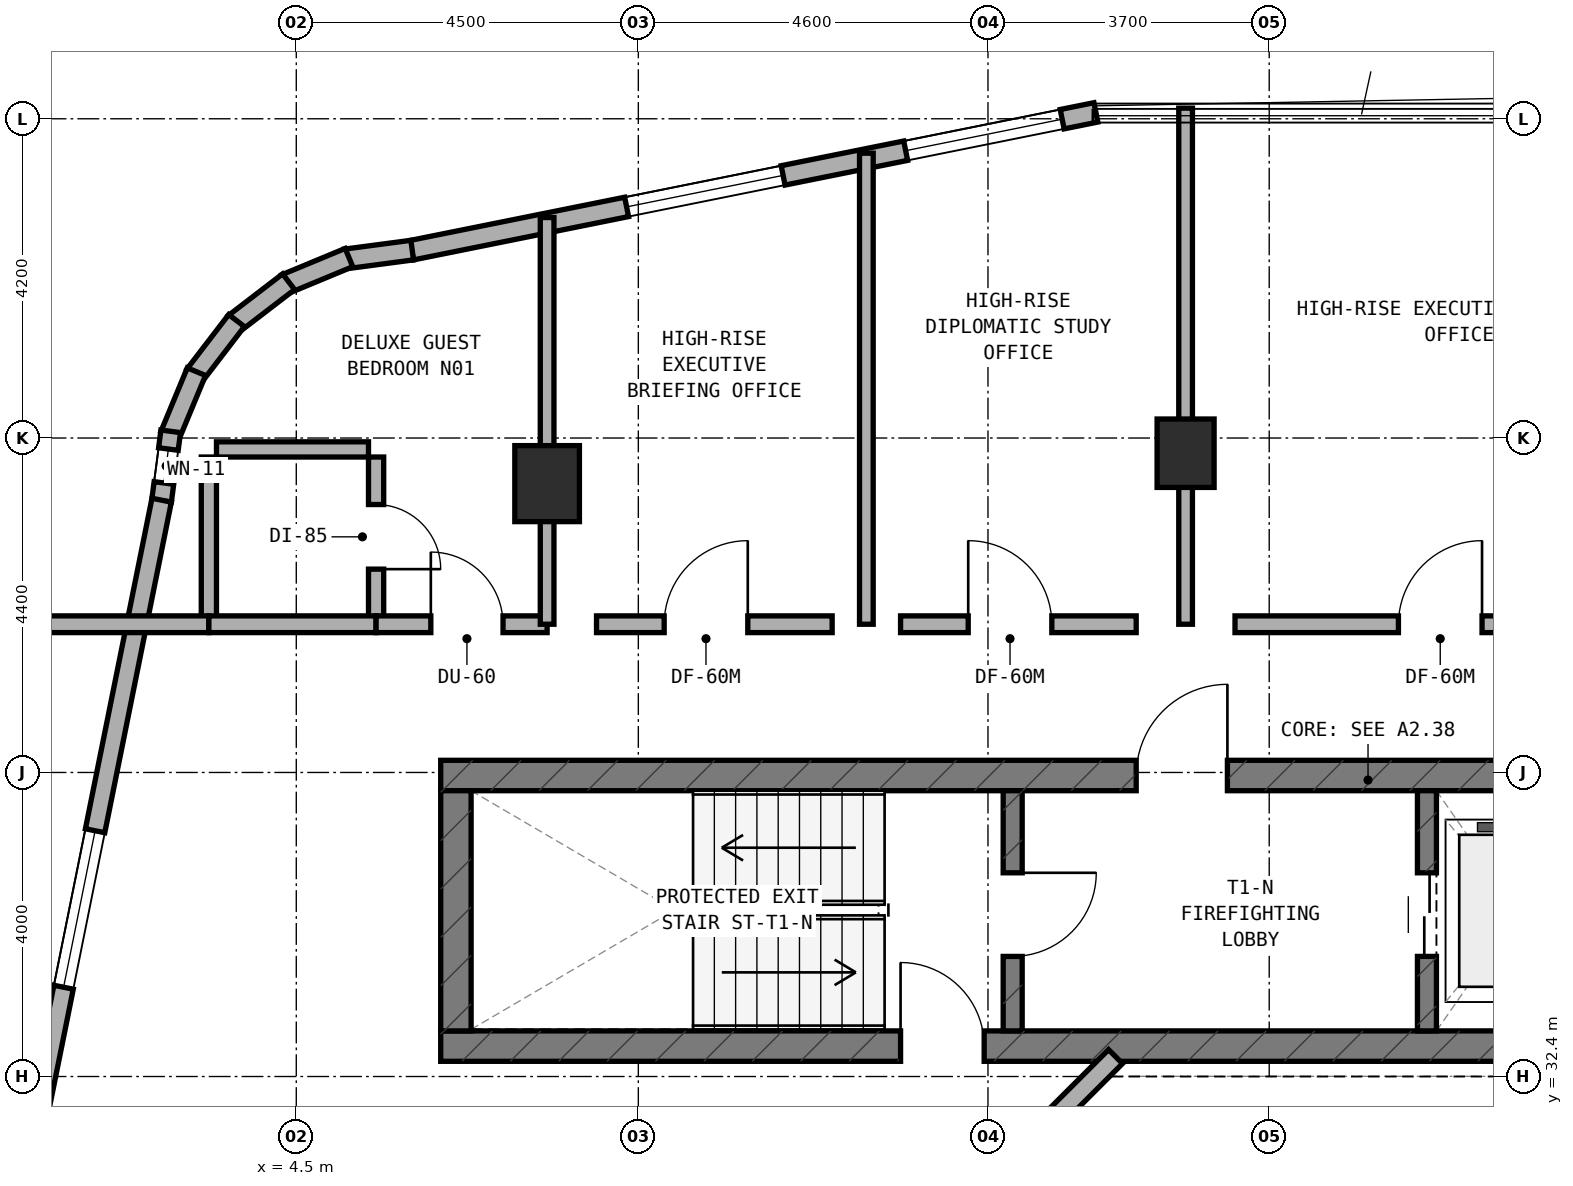
"""IFC4 building model, lengths in metres.
Left out: names, types, materials, properties, quantities, classifications, styles, units other than length and angle.
Written with IfcOpenShell. Run it as: python <this file> out.ifc"""

import sys

from ifc_helpers import new_model, si_unit, direction, frame, frame_2d, origin, origin_2d, place, context, subcontext, project, spatial, rectangle, extrude, element, fill, save


model = new_model("IFC4")
c1 = context("Model", 3, precision=1e-05, world=origin(), true_north=direction((0.0, 1.0)))
c2 = subcontext(c1, "Body", "Model", "MODEL_VIEW")
j1 = project(units=[si_unit("LENGTHUNIT", "METRE"), si_unit("PLANEANGLEUNIT", "RADIAN")], contexts=[c1])
p1 = place(None, origin())
s1 = spatial("IfcSite", under=j1, at=p1, CompositionType="ELEMENT")
p2 = place(p1, origin())
s2 = spatial("IfcBuilding", under=s1, at=p2, CompositionType="ELEMENT")
p3 = place(p2, frame((0.0, 0.0, 169.5)))
s3 = spatial("IfcBuildingStorey", under=s2, at=p3, CompositionType="ELEMENT", Elevation=169.5)
p4 = place(p3, frame((6.4, 32.8, 0.0), z_axis=(0.0, 0.0, 1.0), x_axis=(1.0, 0.0, 0.0)))
e1 = element("IfcWall", 1, at=p4, inside=s3, PredefinedType="SHEAR", context=c2, shape_type="SweptSolid", body=[
    extrude(rectangle(XDim=24.4, YDim=0.4, at=frame_2d((12.2, 0.0))), origin(), (0.0, 0.0, 1.0), 3.5),
])
p5 = place(p4, frame((6.05, 0.0, 0.0)))
e2 = element("IfcOpeningElement", 2, at=p5, cuts=e1, PredefinedType="OPENING", context=c2, shape_type="SweptSolid", body=[
    extrude(rectangle(XDim=1.1, YDim=2.15, at=frame_2d((0.55, 1.075))), frame((0.0, 0.21, 0.0), z_axis=(0.0, -1.0, 0.0), x_axis=(1.0, 0.0, 0.0)), (0.0, 0.0, 1.0), 0.42),
])
p6 = place(p3, frame((6.4, 36.36, 0.0), z_axis=(0.0, 0.0, 1.0), x_axis=(1.0, 0.0, 0.0)))
e3 = element("IfcWall", 3, at=p6, inside=s3, PredefinedType="SHEAR", context=c2, shape_type="SweptSolid", body=[
    extrude(rectangle(XDim=24.4, YDim=0.4, at=frame_2d((12.2, 0.0))), origin(), (0.0, 0.0, 1.0), 3.5),
])
p7 = place(p6, frame((9.15, 0.0, 0.0)))
e4 = element("IfcOpeningElement", 4, at=p7, cuts=e3, PredefinedType="OPENING", context=c2, shape_type="SweptSolid", body=[
    extrude(rectangle(XDim=1.2, YDim=2.15, at=frame_2d((0.6, 1.075))), frame((0.0, 0.21, 0.0), z_axis=(0.0, -1.0, 0.0), x_axis=(1.0, 0.0, 0.0)), (0.0, 0.0, 1.0), 0.42),
])
p8 = place(p6, frame((19.2, 0.0, 0.0)))
e5 = element("IfcOpeningElement", 5, at=p8, cuts=e3, PredefinedType="OPENING", context=c2, shape_type="SweptSolid", body=[
    extrude(rectangle(XDim=0.85, YDim=2.1, at=frame_2d((0.425, 1.05))), frame((0.0, 0.21, 0.0), z_axis=(0.0, -1.0, 0.0), x_axis=(1.0, 0.0, 0.0)), (0.0, 0.0, 1.0), 0.42),
])
p9 = place(p6, frame((16.94, 0.0, 0.0)))
e6 = element("IfcOpeningElement", 6, at=p9, cuts=e3, PredefinedType="OPENING", context=c2, shape_type="SweptSolid", body=[
    extrude(rectangle(XDim=0.85, YDim=2.1, at=frame_2d((0.425, 1.05))), frame((0.0, 0.21, 0.0), z_axis=(0.0, -1.0, 0.0), x_axis=(1.0, 0.0, 0.0)), (0.0, 0.0, 1.0), 0.42),
])
p10 = place(p3, frame((6.6, 33.0, 0.0), z_axis=(0.0, 0.0, 1.0), x_axis=(0.0, 1.0, 0.0)))
e7 = element("IfcWall", 7, at=p10, inside=s3, PredefinedType="SHEAR", context=c2, shape_type="SweptSolid", body=[
    extrude(rectangle(XDim=3.16, YDim=0.4, at=frame_2d((1.58, 0.0))), origin(), (0.0, 0.0, 1.0), 3.5),
])
p11 = place(p3, frame((13.925, 33.0, 0.0), z_axis=(0.0, 0.0, 1.0), x_axis=(0.0, 1.0, 0.0)))
e8 = element("IfcWall", 8, at=p11, inside=s3, PredefinedType="STANDARD", context=c2, shape_type="SweptSolid", body=[
    extrude(rectangle(XDim=3.16, YDim=0.25, at=frame_2d((1.58, 0.0))), origin(), (0.0, 0.0, 1.0), 3.18),
])
p12 = place(p11, frame((0.98, 0.0, 0.0)))
e9 = element("IfcOpeningElement", 9, at=p12, cuts=e8, PredefinedType="OPENING", context=c2, shape_type="SweptSolid", body=[
    extrude(rectangle(XDim=1.1, YDim=2.15, at=frame_2d((0.55, 1.075))), frame((0.0, 0.135, 0.0), z_axis=(0.0, -1.0, 0.0), x_axis=(1.0, 0.0, 0.0)), (0.0, 0.0, 1.0), 0.27),
])
p13 = place(p3, frame((19.375, 33.0, 0.0), z_axis=(0.0, 0.0, 1.0), x_axis=(0.0, 1.0, 0.0)))
e10 = element("IfcWall", 10, at=p13, inside=s3, PredefinedType="STANDARD", context=c2, shape_type="SweptSolid", body=[
    extrude(rectangle(XDim=3.16, YDim=0.25, at=frame_2d((1.58, 0.0))), origin(), (0.0, 0.0, 1.0), 3.18),
])
p14 = place(p13, frame((0.98, 0.0, 0.0)))
e11 = element("IfcOpeningElement", 11, at=p14, cuts=e10, PredefinedType="OPENING", context=c2, shape_type="SweptSolid", body=[
    extrude(rectangle(XDim=1.1, YDim=2.15, at=frame_2d((0.55, 1.075))), frame((0.0, 0.135, 0.0), z_axis=(0.0, -1.0, 0.0), x_axis=(1.0, 0.0, 0.0)), (0.0, 0.0, 1.0), 0.27),
])
p15 = place(p3, frame((16.2, 40.6, 0.0), z_axis=(0.0, 0.0, 1.0), x_axis=(1.0, 0.0, 0.0)))
e12 = element("IfcColumn", 12, at=p15, inside=s3, PredefinedType="COLUMN", context=c2, shape_type="SweptSolid", body=[
    extrude(rectangle(XDim=0.75, YDim=0.9, at=origin_2d()), origin(), (0.0, 0.0, 1.0), 3.5),
])
p16 = place(p3, frame((7.8, 40.2, 0.0), z_axis=(0.0, 0.0, 1.0), x_axis=(1.0, 0.0, 0.0)))
e13 = element("IfcColumn", 13, at=p16, inside=s3, PredefinedType="COLUMN", context=c2, shape_type="SweptSolid", body=[
    extrude(rectangle(XDim=0.85, YDim=1.0, at=origin_2d()), origin(), (0.0, 0.0, 1.0), 3.5),
])
p17 = place(p3, frame((15.02, 45.084, 0.0), z_axis=(0.0, 0.0, 1.0), x_axis=(-0.980315963543, -0.197435082048, 0.0)))
e14 = element("IfcWall", 14, at=p17, inside=s3, PredefinedType="STANDARD", context=c2, shape_type="SweptSolid", body=[
    extrude(rectangle(XDim=9.183, YDim=0.26, at=frame_2d((4.591, 0.0))), origin(), (0.0, 0.0, 1.0), 3.18),
])
p18 = place(p17, frame((0.453, 0.0, 0.85)))
e15 = element("IfcOpeningElement", 15, at=p18, cuts=e14, PredefinedType="OPENING", context=c2, shape_type="SweptSolid", body=[
    extrude(rectangle(XDim=2.1, YDim=1.5, at=frame_2d((1.05, 0.75))), frame((0.0, 0.14, 0.0), z_axis=(0.0, -1.0, 0.0), x_axis=(1.0, 0.0, 0.0)), (0.0, 0.0, 1.0), 0.28),
])
p19 = place(p17, frame((4.198, 0.0, 0.85)))
e16 = element("IfcOpeningElement", 16, at=p19, cuts=e14, PredefinedType="OPENING", context=c2, shape_type="SweptSolid", body=[
    extrude(rectangle(XDim=2.1, YDim=1.5, at=frame_2d((1.05, 0.75))), frame((0.0, 0.14, 0.0), z_axis=(0.0, -1.0, 0.0), x_axis=(1.0, 0.0, 0.0)), (0.0, 0.0, 1.0), 0.28),
])
p20 = place(p3, frame((6.025, 43.272, 0.0), z_axis=(0.0, 0.0, 1.0), x_axis=(-0.991388484223, -0.130953706898, 0.0)))
e17 = element("IfcWall", 17, at=p20, inside=s3, PredefinedType="STANDARD", context=c2, shape_type="SweptSolid", body=[
    extrude(rectangle(XDim=0.885, YDim=0.26, at=frame_2d((0.443, 0.0))), origin(), (0.0, 0.0, 1.0), 3.18),
])
p21 = place(p3, frame((5.193, 43.174, 0.0), z_axis=(0.0, 0.0, 1.0), x_axis=(-0.923627776508, -0.383290660547, 0.0)))
e18 = element("IfcWall", 18, at=p21, inside=s3, PredefinedType="STANDARD", context=c2, shape_type="SweptSolid", body=[
    extrude(rectangle(XDim=0.903, YDim=0.26, at=frame_2d((0.452, 0.0))), origin(), (0.0, 0.0, 1.0), 3.18),
])
p22 = place(p3, frame((4.399, 42.856, 0.0), z_axis=(0.0, 0.0, 1.0), x_axis=(-0.793458244748, -0.608624690463, 0.0)))
e19 = element("IfcWall", 19, at=p22, inside=s3, PredefinedType="STANDARD", context=c2, shape_type="SweptSolid", body=[
    extrude(rectangle(XDim=0.902, YDim=0.26, at=frame_2d((0.451, 0.0))), origin(), (0.0, 0.0, 1.0), 3.18),
])
p23 = place(p3, frame((3.714, 42.345, 0.0), z_axis=(0.0, 0.0, 1.0), x_axis=(-0.608494022858, -0.793558456666, 0.0)))
e20 = element("IfcWall", 20, at=p23, inside=s3, PredefinedType="STANDARD", context=c2, shape_type="SweptSolid", body=[
    extrude(rectangle(XDim=0.902, YDim=0.26, at=frame_2d((0.451, 0.0))), origin(), (0.0, 0.0, 1.0), 3.18),
])
p24 = place(p3, frame((3.186, 41.673, 0.0), z_axis=(0.0, 0.0, 1.0), x_axis=(-0.383155708213, -0.923683767999, 0.0)))
e21 = element("IfcWall", 21, at=p24, inside=s3, PredefinedType="STANDARD", context=c2, shape_type="SweptSolid", body=[
    extrude(rectangle(XDim=0.903, YDim=0.26, at=frame_2d((0.451, 0.0))), origin(), (0.0, 0.0, 1.0), 3.18),
])
p25 = place(p3, frame((2.848, 40.888, 0.0), z_axis=(0.0, 0.0, 1.0), x_axis=(-0.130200706103, -0.991487658083, 0.0)))
e22 = element("IfcWall", 22, at=p25, inside=s3, PredefinedType="STANDARD", context=c2, shape_type="SweptSolid", body=[
    extrude(rectangle(XDim=0.921, YDim=0.26, at=frame_2d((0.46, 0.0))), origin(), (0.0, 0.0, 1.0), 3.18),
])
p26 = place(p25, frame((0.235, 0.0, 0.85)))
e23 = element("IfcOpeningElement", 23, at=p26, cuts=e22, PredefinedType="OPENING", context=c2, shape_type="SweptSolid", body=[
    extrude(rectangle(XDim=0.45, YDim=1.5, at=frame_2d((0.225, 0.75))), frame((0.0, 0.14, 0.0), z_axis=(0.0, -1.0, 0.0), x_axis=(1.0, 0.0, 0.0)), (0.0, 0.0, 1.0), 0.28),
])
p27 = place(p3, frame((2.729, 39.982, 0.0), z_axis=(0.0, 0.0, 1.0), x_axis=(-0.197435082048, -0.980315963543, 0.0)))
e24 = element("IfcWall", 24, at=p27, inside=s3, PredefinedType="STANDARD", context=c2, shape_type="SweptSolid", body=[
    extrude(rectangle(XDim=9.183, YDim=0.26, at=frame_2d((4.591, 0.0))), origin(), (0.0, 0.0, 1.0), 3.18),
])
p28 = place(p27, frame((4.436, 0.0, 0.85)))
e25 = element("IfcOpeningElement", 25, at=p28, cuts=e24, PredefinedType="OPENING", context=c2, shape_type="SweptSolid", body=[
    extrude(rectangle(XDim=2.1, YDim=1.5, at=frame_2d((1.05, 0.75))), frame((0.0, 0.14, 0.0), z_axis=(0.0, -1.0, 0.0), x_axis=(1.0, 0.0, 0.0)), (0.0, 0.0, 1.0), 0.28),
])
p29 = place(p3, frame((15.278, 32.662, 0.0), z_axis=(0.0, 0.0, 1.0), x_axis=(-0.707059717605, -0.707153841636, 0.0)))
e26 = element("IfcWall", 26, at=p29, inside=s3, PredefinedType="STANDARD", context=c2, shape_type="SweptSolid", body=[
    extrude(rectangle(XDim=2.594, YDim=0.26, at=frame_2d((1.297, 0.0))), origin(), (0.0, 0.0, 1.0), 3.18),
])
p30 = place(p3, frame((5.55, 38.45, 0.0), z_axis=(0.0, 0.0, 1.0), x_axis=(0.0, 1.0, 0.0)))
e27 = element("IfcWall", 27, at=p30, inside=s3, PredefinedType="PLUMBINGWALL", context=c2, shape_type="SweptSolid", body=[
    extrude(rectangle(XDim=2.1, YDim=0.2, at=frame_2d((1.05, 0.0))), origin(), (0.0, 0.0, 1.0), 3.18),
])
p31 = place(p30, frame((0.625, 0.0, 0.0)))
e28 = element("IfcOpeningElement", 28, at=p31, cuts=e27, PredefinedType="OPENING", context=c2, shape_type="SweptSolid", body=[
    extrude(rectangle(XDim=0.85, YDim=2.1, at=frame_2d((0.425, 1.05))), frame((0.0, 0.11, 0.0), z_axis=(0.0, -1.0, 0.0), x_axis=(1.0, 0.0, 0.0)), (0.0, 0.0, 1.0), 0.22),
])
p32 = place(p3, frame((3.45, 40.65, 0.0), z_axis=(0.0, 0.0, 1.0), x_axis=(1.0, 0.0, 0.0)))
e29 = element("IfcWall", 29, at=p32, inside=s3, PredefinedType="PLUMBINGWALL", context=c2, shape_type="SweptSolid", body=[
    extrude(rectangle(XDim=2.0, YDim=0.2, at=frame_2d((1.0, 0.0))), origin(), (0.0, 0.0, 1.0), 3.18),
])
p33 = place(p3, frame((3.35, 38.45, 0.0), z_axis=(0.0, 0.0, 1.0), x_axis=(0.0, 1.0, 0.0)))
e30 = element("IfcWall", 30, at=p33, inside=s3, PredefinedType="PLUMBINGWALL", context=c2, shape_type="SweptSolid", body=[
    extrude(rectangle(XDim=2.1, YDim=0.2, at=frame_2d((1.05, 0.0))), origin(), (0.0, 0.0, 1.0), 3.18),
])
p34 = place(p3, frame((0.96, 38.35, 0.0), z_axis=(0.0, 0.0, 1.0), x_axis=(1.0, 0.0, 0.0)))
e31 = element("IfcWall", 31, at=p34, inside=s3, PredefinedType="SOLIDWALL", context=c2, shape_type="SweptSolid", body=[
    extrude(rectangle(XDim=2.39, YDim=0.22, at=frame_2d((1.195, 0.0))), origin(), (0.0, 0.0, 1.0), 3.18),
])
p35 = place(p3, frame((3.35, 38.35, 0.0), z_axis=(0.0, 0.0, 1.0), x_axis=(1.0, 0.0, 0.0)))
e32 = element("IfcWall", 32, at=p35, inside=s3, PredefinedType="SOLIDWALL", context=c2, shape_type="SweptSolid", body=[
    extrude(rectangle(XDim=2.2, YDim=0.22, at=frame_2d((1.1, 0.0))), origin(), (0.0, 0.0, 1.0), 3.18),
])
p36 = place(p3, frame((5.55, 38.35, 0.0), z_axis=(0.0, 0.0, 1.0), x_axis=(1.0, 0.0, 0.0)))
e33 = element("IfcWall", 33, at=p36, inside=s3, PredefinedType="SOLIDWALL", context=c2, shape_type="SweptSolid", body=[
    extrude(rectangle(XDim=2.25, YDim=0.22, at=frame_2d((1.125, 0.0))), origin(), (0.0, 0.0, 1.0), 2.855),
])
p37 = place(p36, frame((0.72, 0.0, 0.0)))
e34 = element("IfcOpeningElement", 34, at=p37, cuts=e33, PredefinedType="OPENING", context=c2, shape_type="SweptSolid", body=[
    extrude(rectangle(XDim=0.95, YDim=2.1, at=frame_2d((0.475, 1.05))), frame((0.0, 0.12, 0.0), z_axis=(0.0, -1.0, 0.0), x_axis=(1.0, 0.0, 0.0)), (0.0, 0.0, 1.0), 0.24),
])
p38 = place(p3, frame((7.8, 38.35, 0.0), z_axis=(0.0, 0.0, 1.0), x_axis=(0.0, 1.0, 0.0)))
e35 = element("IfcWall", 35, at=p38, inside=s3, PredefinedType="SOLIDWALL", context=c2, shape_type="SweptSolid", body=[
    extrude(rectangle(XDim=5.351, YDim=0.18, at=frame_2d((2.675, 0.0))), origin(), (0.0, 0.0, 1.0), 2.795),
])
p39 = place(p3, frame((12.0, 38.35, 0.0), z_axis=(0.0, 0.0, 1.0), x_axis=(0.0, 1.0, 0.0)))
e36 = element("IfcWall", 36, at=p39, inside=s3, PredefinedType="SOLIDWALL", context=c2, shape_type="SweptSolid", body=[
    extrude(rectangle(XDim=6.197, YDim=0.18, at=frame_2d((3.099, 0.0))), origin(), (0.0, 0.0, 1.0), 2.795),
])
p40 = place(p3, frame((8.45, 38.35, 0.0), z_axis=(0.0, 0.0, 1.0), x_axis=(1.0, 0.0, 0.0)))
e37 = element("IfcWall", 37, at=p40, inside=s3, PredefinedType="SOLIDWALL", context=c2, shape_type="SweptSolid", body=[
    extrude(rectangle(XDim=3.1, YDim=0.22, at=frame_2d((1.55, 0.0))), origin(), (0.0, 0.0, 1.0), 3.18),
])
p41 = place(p40, frame((0.89, 0.0, 0.0)))
e38 = element("IfcOpeningElement", 38, at=p41, cuts=e37, PredefinedType="OPENING", context=c2, shape_type="SweptSolid", body=[
    extrude(rectangle(XDim=1.1, YDim=2.1, at=frame_2d((0.55, 1.05))), frame((0.0, 0.12, 0.0), z_axis=(0.0, -1.0, 0.0), x_axis=(1.0, 0.0, 0.0)), (0.0, 0.0, 1.0), 0.24),
])
p42 = place(p3, frame((12.45, 38.35, 0.0), z_axis=(0.0, 0.0, 1.0), x_axis=(1.0, 0.0, 0.0)))
e39 = element("IfcWall", 39, at=p42, inside=s3, PredefinedType="SOLIDWALL", context=c2, shape_type="SweptSolid", body=[
    extrude(rectangle(XDim=3.1, YDim=0.22, at=frame_2d((1.55, 0.0))), origin(), (0.0, 0.0, 1.0), 3.18),
])
p43 = place(p42, frame((0.89, 0.0, 0.0)))
e40 = element("IfcOpeningElement", 40, at=p43, cuts=e39, PredefinedType="OPENING", context=c2, shape_type="SweptSolid", body=[
    extrude(rectangle(XDim=1.1, YDim=2.1, at=frame_2d((0.55, 1.05))), frame((0.0, 0.12, 0.0), z_axis=(0.0, -1.0, 0.0), x_axis=(1.0, 0.0, 0.0)), (0.0, 0.0, 1.0), 0.24),
])
p44 = place(p3, frame((16.2, 38.35, 0.0), z_axis=(0.0, 0.0, 1.0), x_axis=(0.0, 1.0, 0.0)))
e41 = element("IfcWall", 41, at=p44, inside=s3, PredefinedType="SOLIDWALL", context=c2, shape_type="SweptSolid", body=[
    extrude(rectangle(XDim=6.79, YDim=0.18, at=frame_2d((3.395, 0.0))), origin(), (0.0, 0.0, 1.0), 2.795),
])
p45 = place(p3, frame((16.85, 38.35, 0.0), z_axis=(0.0, 0.0, 1.0), x_axis=(1.0, 0.0, 0.0)))
e42 = element("IfcWall", 42, at=p45, inside=s3, PredefinedType="SOLIDWALL", context=c2, shape_type="SweptSolid", body=[
    extrude(rectangle(XDim=5.9, YDim=0.22, at=frame_2d((2.95, 0.0))), origin(), (0.0, 0.0, 1.0), 3.18),
])
p46 = place(p45, frame((2.15, 0.0, 0.0)))
e43 = element("IfcOpeningElement", 43, at=p46, cuts=e42, PredefinedType="OPENING", context=c2, shape_type="SweptSolid", body=[
    extrude(rectangle(XDim=1.1, YDim=2.1, at=frame_2d((0.55, 1.05))), frame((0.0, 0.12, 0.0), z_axis=(0.0, -1.0, 0.0), x_axis=(1.0, 0.0, 0.0)), (0.0, 0.0, 1.0), 0.24),
])
p47 = place(p18, origin())
e44 = element("IfcWindow", 44, at=p47, inside=s3, PartitioningType="SINGLE_PANEL", PredefinedType="WINDOW", context=c2, shape_type="SweptSolid", body=[
    extrude(rectangle(XDim=2.1, YDim=1.5, at=frame_2d((1.05, 0.75))), frame((0.0, 0.03, 0.0), z_axis=(0.0, -1.0, 0.0), x_axis=(1.0, 0.0, 0.0)), (0.0, 0.0, 1.0), 0.06),
])
fill(e15, e44)
p48 = place(p19, origin())
e45 = element("IfcWindow", 45, at=p48, inside=s3, PartitioningType="SINGLE_PANEL", PredefinedType="WINDOW", context=c2, shape_type="SweptSolid", body=[
    extrude(rectangle(XDim=2.1, YDim=1.5, at=frame_2d((1.05, 0.75))), frame((0.0, 0.03, 0.0), z_axis=(0.0, -1.0, 0.0), x_axis=(1.0, 0.0, 0.0)), (0.0, 0.0, 1.0), 0.06),
])
fill(e16, e45)
p49 = place(p28, origin())
e46 = element("IfcWindow", 46, at=p49, inside=s3, PartitioningType="SINGLE_PANEL", PredefinedType="WINDOW", context=c2, shape_type="SweptSolid", body=[
    extrude(rectangle(XDim=2.1, YDim=1.5, at=frame_2d((1.05, 0.75))), frame((0.0, 0.03, 0.0), z_axis=(0.0, -1.0, 0.0), x_axis=(1.0, 0.0, 0.0)), (0.0, 0.0, 1.0), 0.06),
])
fill(e25, e46)
p50 = place(p26, origin())
e47 = element("IfcWindow", 47, at=p50, inside=s3, PartitioningType="SINGLE_PANEL", PredefinedType="WINDOW", context=c2, shape_type="SweptSolid", body=[
    extrude(rectangle(XDim=0.45, YDim=1.5, at=frame_2d((0.225, 0.75))), frame((0.0, 0.03, 0.0), z_axis=(0.0, -1.0, 0.0), x_axis=(1.0, 0.0, 0.0)), (0.0, 0.0, 1.0), 0.06),
])
fill(e23, e47)
p51 = place(p12, frame((1.1, 0.0, 0.0), z_axis=(0.0, 0.0, 1.0), x_axis=(-1.0, 0.0, 0.0)))
e48 = element("IfcDoor", 48, at=p51, inside=s3, OperationType="SINGLE_SWING_LEFT", PredefinedType="DOOR", context=c2, shape_type="SweptSolid", body=[
    extrude(rectangle(XDim=1.1, YDim=2.15, at=frame_2d((0.55, 1.075))), frame((0.0, 0.025, 0.0), z_axis=(0.0, -1.0, 0.0), x_axis=(1.0, 0.0, 0.0)), (0.0, 0.0, 1.0), 0.05),
])
fill(e9, e48)
p52 = place(p7, origin())
e49 = element("IfcDoor", 49, at=p52, inside=s3, OperationType="SINGLE_SWING_RIGHT", PredefinedType="DOOR", context=c2, shape_type="SweptSolid", body=[
    extrude(rectangle(XDim=1.2, YDim=2.15, at=frame_2d((0.6, 1.075))), frame((0.0, 0.025, 0.0), z_axis=(0.0, -1.0, 0.0), x_axis=(1.0, 0.0, 0.0)), (0.0, 0.0, 1.0), 0.05),
])
fill(e4, e49)
p53 = place(p14, origin())
e50 = element("IfcDoor", 50, at=p53, inside=s3, OperationType="DOUBLE_DOOR_SLIDING", PredefinedType="DOOR", context=c2, shape_type="SweptSolid", body=[
    extrude(rectangle(XDim=1.1, YDim=2.15, at=frame_2d((0.55, 1.075))), frame((0.0, 0.025, 0.0), z_axis=(0.0, -1.0, 0.0), x_axis=(1.0, 0.0, 0.0)), (0.0, 0.0, 1.0), 0.05),
])
fill(e11, e50)
p54 = place(p5, origin())
e51 = element("IfcDoor", 51, at=p54, inside=s3, OperationType="SINGLE_SWING_LEFT", PredefinedType="DOOR", context=c2, shape_type="SweptSolid", body=[
    extrude(rectangle(XDim=1.1, YDim=2.15, at=frame_2d((0.55, 1.075))), frame((0.0, 0.025, 0.0), z_axis=(0.0, -1.0, 0.0), x_axis=(1.0, 0.0, 0.0)), (0.0, 0.0, 1.0), 0.05),
])
fill(e2, e51)
p55 = place(p31, frame((0.85, 0.0, 0.0), z_axis=(0.0, 0.0, 1.0), x_axis=(-1.0, 0.0, 0.0)))
e52 = element("IfcDoor", 52, at=p55, inside=s3, OperationType="SINGLE_SWING_RIGHT", PredefinedType="DOOR", context=c2, shape_type="SweptSolid", body=[
    extrude(rectangle(XDim=0.85, YDim=2.1, at=frame_2d((0.425, 1.05))), frame((0.0, 0.025, 0.0), z_axis=(0.0, -1.0, 0.0), x_axis=(1.0, 0.0, 0.0)), (0.0, 0.0, 1.0), 0.05),
])
fill(e28, e52)
p56 = place(p37, origin())
e53 = element("IfcDoor", 53, at=p56, inside=s3, OperationType="SINGLE_SWING_LEFT", PredefinedType="DOOR", context=c2, shape_type="SweptSolid", body=[
    extrude(rectangle(XDim=0.95, YDim=2.1, at=frame_2d((0.475, 1.05))), frame((0.0, 0.025, 0.0), z_axis=(0.0, -1.0, 0.0), x_axis=(1.0, 0.0, 0.0)), (0.0, 0.0, 1.0), 0.05),
])
fill(e34, e53)
p57 = place(p41, origin())
e54 = element("IfcDoor", 54, at=p57, inside=s3, OperationType="SINGLE_SWING_RIGHT", PredefinedType="DOOR", context=c2, shape_type="SweptSolid", body=[
    extrude(rectangle(XDim=1.1, YDim=2.1, at=frame_2d((0.55, 1.05))), frame((0.0, 0.025, 0.0), z_axis=(0.0, -1.0, 0.0), x_axis=(1.0, 0.0, 0.0)), (0.0, 0.0, 1.0), 0.05),
])
fill(e38, e54)
p58 = place(p43, origin())
e55 = element("IfcDoor", 55, at=p58, inside=s3, OperationType="SINGLE_SWING_LEFT", PredefinedType="DOOR", context=c2, shape_type="SweptSolid", body=[
    extrude(rectangle(XDim=1.1, YDim=2.1, at=frame_2d((0.55, 1.05))), frame((0.0, 0.025, 0.0), z_axis=(0.0, -1.0, 0.0), x_axis=(1.0, 0.0, 0.0)), (0.0, 0.0, 1.0), 0.05),
])
fill(e40, e55)
p59 = place(p46, origin())
e56 = element("IfcDoor", 56, at=p59, inside=s3, OperationType="SINGLE_SWING_RIGHT", PredefinedType="DOOR", context=c2, shape_type="SweptSolid", body=[
    extrude(rectangle(XDim=1.1, YDim=2.1, at=frame_2d((0.55, 1.05))), frame((0.0, 0.025, 0.0), z_axis=(0.0, -1.0, 0.0), x_axis=(1.0, 0.0, 0.0)), (0.0, 0.0, 1.0), 0.05),
])
fill(e43, e56)
save(model, sys.argv[1])
